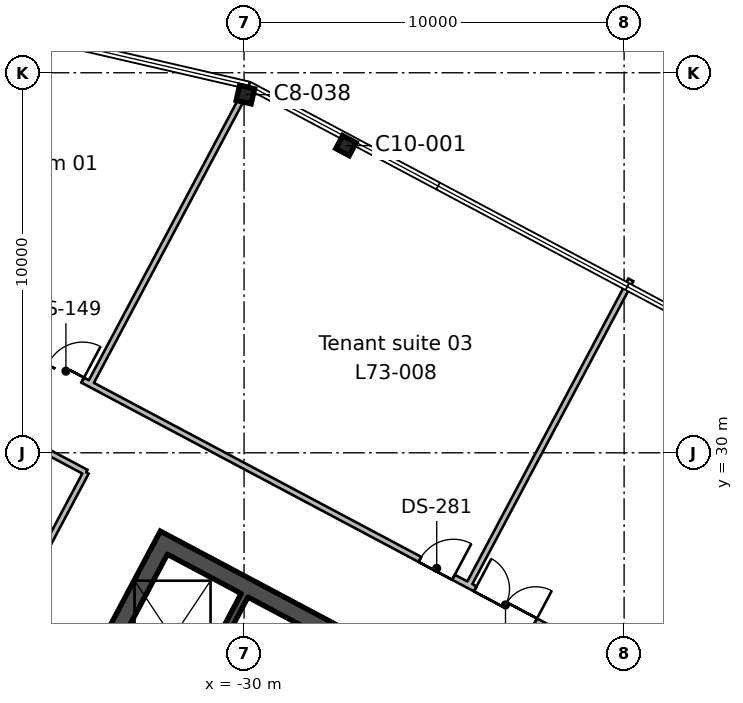
"""IFC4 building model, lengths in metres.
Left out: names, types, materials, properties, quantities, classifications, styles, units other than length and angle.
Written with IfcOpenShell. Run it as: python <this file> out.ifc"""

import sys

from ifc_helpers import new_model, si_unit, direction, frame, frame_2d, origin, origin_2d, place, context, subcontext, project, spatial, rectangle, i_section, extrude, element, fill, save


model = new_model("IFC4")
c1 = context("Model", 3, precision=1e-05, world=origin(), true_north=direction((0.0, 1.0)))
c2 = subcontext(c1, "Body", "Model", "MODEL_VIEW")
j1 = project(units=[si_unit("LENGTHUNIT", "METRE"), si_unit("PLANEANGLEUNIT", "RADIAN")], contexts=[c1])
p1 = place(None, origin())
s1 = spatial("IfcSite", under=j1, at=p1, CompositionType="ELEMENT")
p2 = place(p1, origin())
s2 = spatial("IfcBuilding", under=s1, at=p2, CompositionType="ELEMENT")
p3 = place(p2, frame((0.0, 0.0, 320.4)))
s3 = spatial("IfcBuildingStorey", under=s2, at=p3, CompositionType="ELEMENT", Elevation=320.4)
p4 = place(p3, frame((-27.319, 38.083, 0.0), z_axis=(0.0, 0.0, 1.0), x_axis=(-0.882947592859, 0.469471562786, 0.0)))
e1 = element("IfcColumn", 1, at=p4, inside=s3, PredefinedType="COLUMN", context=c2, shape_type="SweptSolid", body=[
    extrude(i_section(OverallWidth=0.399, OverallDepth=0.386, WebThickness=0.021, FlangeThickness=0.033, FilletRadius=0.015, at=origin_2d()), origin(), (0.0, 0.0, 1.0), 3.9),
])
p5 = place(p3, frame((-29.965, 39.425, 0.0), z_axis=(0.0, 0.0, 1.0), x_axis=(-0.974370064785, 0.224951054344, 0.0)))
e2 = element("IfcColumn", 2, at=p5, inside=s3, PredefinedType="COLUMN", context=c2, shape_type="SweptSolid", body=[
    extrude(i_section(OverallWidth=0.404, OverallDepth=0.406, WebThickness=0.027, FlangeThickness=0.044, FilletRadius=0.015, at=origin_2d()), origin(), (0.0, 0.0, 1.0), 3.9),
])
p6 = place(p3, frame((-32.004, 27.833, 0.0), z_axis=(0.0, 0.0, 1.0), x_axis=(-0.469467968382, -0.882949504028, 0.0)))
e3 = element("IfcWall", 3, at=p6, inside=s3, PredefinedType="SHEAR", context=c2, shape_type="SweptSolid", body=[
    extrude(rectangle(XDim=19.1, YDim=0.45, at=frame_2d((9.55, 0.0))), origin(), (0.0, 0.0, 1.0), 3.9),
])
p7 = place(p6, frame((10.15, 0.0, 0.0)))
e4 = element("IfcOpeningElement", 4, at=p7, cuts=e3, PredefinedType="OPENING", context=c2, shape_type="SweptSolid", body=[
    extrude(rectangle(XDim=2.4, YDim=2.4, at=frame_2d((1.2, 1.2))), frame((0.0, 0.235, 0.0), z_axis=(0.0, -1.0, 0.0), x_axis=(1.0, 0.0, 0.0)), (0.0, 0.0, 1.0), 0.47),
])
p8 = place(p3, frame((-14.076, 18.045, 0.0), z_axis=(0.0, 0.0, 1.0), x_axis=(-0.882947755831, 0.46947125628, 0.0)))
e5 = element("IfcWall", 5, at=p8, inside=s3, PredefinedType="SHEAR", context=c2, shape_type="SweptSolid", body=[
    extrude(rectangle(XDim=20.2, YDim=0.45, at=frame_2d((10.1, 0.0))), origin(), (0.0, 0.0, 1.0), 3.9),
])
p9 = place(p3, frame((-29.986, 26.25, 0.0), z_axis=(0.0, 0.0, 1.0), x_axis=(-0.469494272526, -0.882935517501, 0.0)))
e6 = element("IfcWall", 6, at=p9, inside=s3, PredefinedType="SHEAR", context=c2, shape_type="SweptSolid", body=[
    extrude(rectangle(XDim=3.65, YDim=0.2, at=frame_2d((1.825, 0.0))), origin(), (0.0, 0.0, 1.0), 3.9),
])
p10 = place(p3, frame((-48.947, 39.73, 0.0), z_axis=(0.0, 0.0, 1.0), x_axis=(0.882945454821, -0.469475583828, 0.0)))
e7 = element("IfcWall", 7, at=p10, inside=s3, PredefinedType="PARTITIONING", context=c2, shape_type="SweptSolid", body=[
    extrude(rectangle(XDim=55.436, YDim=0.15, at=frame_2d((27.718, 0.0))), origin(), (0.0, 0.0, 1.0), 3.54),
])
p11 = place(p10, frame((28.35, 0.0, 0.0)))
e8 = element("IfcOpeningElement", 8, at=p11, cuts=e7, PredefinedType="OPENING", context=c2, shape_type="SweptSolid", body=[
    extrude(rectangle(XDim=1.8, YDim=2.1, at=frame_2d((0.9, 1.05))), frame((0.0, 0.085, 0.0), z_axis=(0.0, -1.0, 0.0), x_axis=(1.0, 0.0, 0.0)), (0.0, 0.0, 1.0), 0.17),
])
p12 = place(p10, frame((26.7, 0.0, 0.0)))
e9 = element("IfcOpeningElement", 9, at=p12, cuts=e7, PredefinedType="OPENING", context=c2, shape_type="SweptSolid", body=[
    extrude(rectangle(XDim=1.0, YDim=2.1, at=frame_2d((0.5, 1.05))), frame((0.0, 0.085, 0.0), z_axis=(0.0, -1.0, 0.0), x_axis=(1.0, 0.0, 0.0)), (0.0, 0.0, 1.0), 0.17),
])
p13 = place(p10, frame((15.65, 0.0, 0.0)))
e10 = element("IfcOpeningElement", 10, at=p13, cuts=e7, PredefinedType="OPENING", context=c2, shape_type="SweptSolid", body=[
    extrude(rectangle(XDim=1.0, YDim=2.1, at=frame_2d((0.5, 1.05))), frame((0.0, 0.085, 0.0), z_axis=(0.0, -1.0, 0.0), x_axis=(1.0, 0.0, 0.0)), (0.0, 0.0, 1.0), 0.17),
])
p14 = place(p3, frame((-42.984, 34.181, 0.0), z_axis=(0.0, 0.0, 1.0), x_axis=(0.882929457898, -0.469505668097, 0.0)))
e11 = element("IfcWall", 11, at=p14, inside=s3, PredefinedType="PARTITIONING", context=c2, shape_type="SweptSolid", body=[
    extrude(rectangle(XDim=10.0, YDim=0.15, at=frame_2d((5.0, 0.0))), origin(), (0.0, 0.0, 1.0), 3.54),
])
p15 = place(p3, frame((-34.155, 29.486, 0.0), z_axis=(0.0, 0.0, 1.0), x_axis=(-0.469446756585, -0.882960782103, 0.0)))
e12 = element("IfcWall", 12, at=p15, inside=s3, PredefinedType="PARTITIONING", context=c2, shape_type="SweptSolid", body=[
    extrude(rectangle(XDim=20.0, YDim=0.15, at=frame_2d((10.0, 0.0))), origin(), (0.0, 0.0, 1.0), 3.54),
])
p16 = place(p3, frame((-30.098, 39.247, 0.0), z_axis=(0.0, 0.0, 1.0), x_axis=(-0.469450486213, -0.882958799149, 0.0)))
e13 = element("IfcWall", 13, at=p16, inside=s3, PredefinedType="PARTITIONING", context=c2, shape_type="SweptSolid", body=[
    extrude(rectangle(XDim=8.423, YDim=0.15, at=frame_2d((4.211, 0.0))), origin(), (0.0, 0.0, 1.0), 3.54),
])
p17 = place(p3, frame((-19.822, 34.55, 0.0), z_axis=(0.0, 0.0, 1.0), x_axis=(-0.46943766298, -0.882965616871, 0.0)))
e14 = element("IfcWall", 14, at=p17, inside=s3, PredefinedType="PARTITIONING", context=c2, shape_type="SweptSolid", body=[
    extrude(rectangle(XDim=9.1, YDim=0.15, at=frame_2d((4.55, 0.0))), origin(), (0.0, 0.0, 1.0), 3.54),
])
p18 = place(p11, origin())
e15 = element("IfcDoor", 15, at=p18, inside=s3, OperationType="DOUBLE_DOOR_SINGLE_SWING", PredefinedType="DOOR", context=c2, shape_type="SweptSolid", body=[
    extrude(rectangle(XDim=1.8, YDim=2.1, at=frame_2d((0.9, 1.05))), frame((0.0, 0.025, 0.0), z_axis=(0.0, -1.0, 0.0), x_axis=(1.0, 0.0, 0.0)), (0.0, 0.0, 1.0), 0.05),
])
fill(e8, e15)
p19 = place(p12, origin())
e16 = element("IfcDoor", 16, at=p19, inside=s3, OperationType="SINGLE_SWING_RIGHT", PredefinedType="DOOR", context=c2, shape_type="SweptSolid", body=[
    extrude(rectangle(XDim=1.0, YDim=2.1, at=frame_2d((0.5, 1.05))), frame((0.0, 0.025, 0.0), z_axis=(0.0, -1.0, 0.0), x_axis=(1.0, 0.0, 0.0)), (0.0, 0.0, 1.0), 0.05),
])
fill(e9, e16)
p20 = place(p13, origin())
e17 = element("IfcDoor", 17, at=p20, inside=s3, OperationType="SINGLE_SWING_RIGHT", PredefinedType="DOOR", context=c2, shape_type="SweptSolid", body=[
    extrude(rectangle(XDim=1.0, YDim=2.1, at=frame_2d((0.5, 1.05))), frame((0.0, 0.025, 0.0), z_axis=(0.0, -1.0, 0.0), x_axis=(1.0, 0.0, 0.0)), (0.0, 0.0, 1.0), 0.05),
])
fill(e10, e17)
save(model, sys.argv[1])
